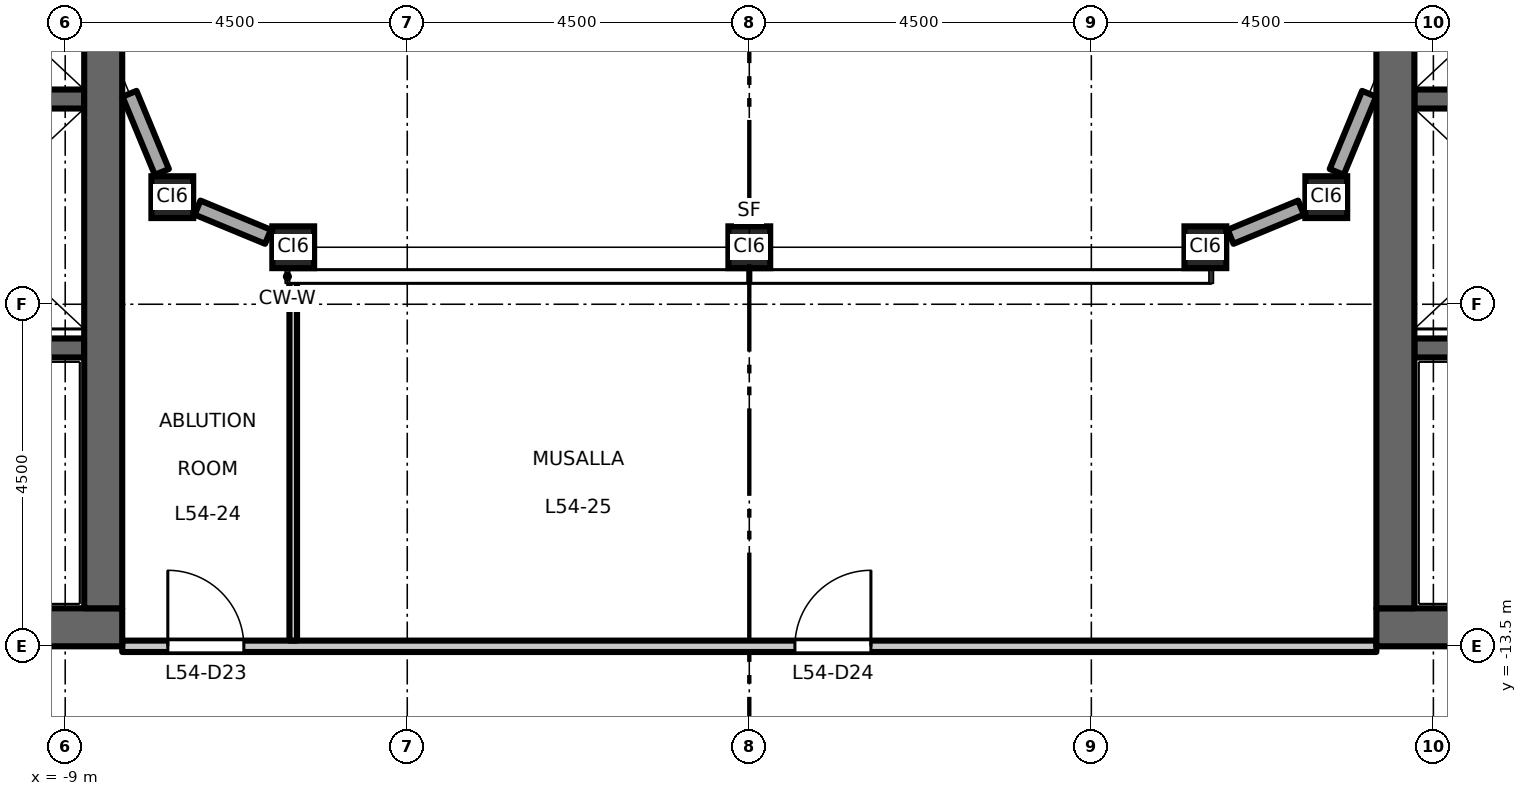
"""IFC4 building model, lengths in metres.
Left out: names, types, materials, properties, quantities, classifications, styles, units other than length and angle.
Written with IfcOpenShell. Run it as: python <this file> out.ifc"""

import sys

from ifc_helpers import new_model, si_unit, direction, frame, frame_2d, origin, origin_2d, place, context, subcontext, project, spatial, rectangle, hollow_rectangle, extrude, element, fill, save


model = new_model("IFC4")
c1 = context("Model", 3, precision=1e-05, world=origin(), true_north=direction((0.0, 1.0)))
c2 = subcontext(c1, "Body", "Model", "MODEL_VIEW")
j1 = project(units=[si_unit("LENGTHUNIT", "METRE"), si_unit("PLANEANGLEUNIT", "RADIAN")], contexts=[c1])
p1 = place(None, origin())
s1 = spatial("IfcSite", under=j1, at=p1, CompositionType="ELEMENT")
p2 = place(p1, origin())
s2 = spatial("IfcBuilding", under=s1, at=p2, CompositionType="ELEMENT")
p3 = place(p2, frame((0.0, 0.0, 251.2)))
s3 = spatial("IfcBuildingStorey", under=s2, at=p3, CompositionType="ELEMENT", Elevation=251.2)
for number, where, z_axis, x_axis in (
    (1, (-7.591, -7.591, 0.0), (0.0, 0.0, 1.0), (1.0, 0.0, 0.0)),
    (2, (-6.0, -8.25, 0.0), (0.0, 0.0, 1.0), (1.0, 0.0, 0.0)),
    (3, (0.0, -8.25, 0.0), (0.0, 0.0, 1.0), (1.0, 0.0, 0.0)),
    (4, (6.0, -8.25, 0.0), (0.0, 0.0, 1.0), (1.0, 0.0, 0.0)),
    (5, (7.591, -7.591, 0.0), (0.0, 0.0, 1.0), (1.0, 0.0, 0.0)),
):
    element("IfcColumn", number, at=place(p3, frame(where, z_axis=z_axis, x_axis=x_axis)), inside=s3, PredefinedType="COLUMN", context=c2, shape_type="SweptSolid", body=[
        extrude(hollow_rectangle(XDim=0.55, YDim=0.55, WallThickness=0.028, at=origin_2d()), origin(), (0.0, 0.0, 1.0), 4.5),
    ])
p4 = place(p3, frame((-8.75, -6.3, 0.0), z_axis=(0.0, 0.0, 1.0), x_axis=(-1.0, 0.0, 0.0)))
e6 = element("IfcWall", 6, at=p4, inside=s3, PredefinedType="SHEAR", context=c2, shape_type="SweptSolid", body=[
    extrude(rectangle(XDim=3.1, YDim=0.25, at=frame_2d((1.55, 0.0))), origin(), (0.0, 0.0, 1.0), 4.35),
])
p5 = place(p3, frame((-8.75, -9.575, 0.0), z_axis=(0.0, 0.0, 1.0), x_axis=(-1.0, 0.0, 0.0)))
e7 = element("IfcWall", 7, at=p5, inside=s3, PredefinedType="SHEAR", context=c2, shape_type="SweptSolid", body=[
    extrude(rectangle(XDim=8.0, YDim=0.25, at=frame_2d((4.0, 0.0))), origin(), (0.0, 0.0, 1.0), 4.35),
])
p6 = place(p5, frame((6.65, 0.0, 0.0)))
e8 = element("IfcOpeningElement", 8, at=p6, cuts=e7, PredefinedType="OPENING", context=c2, shape_type="SweptSolid", body=[
    extrude(rectangle(XDim=1.1, YDim=2.1, at=frame_2d((0.55, 1.05))), frame((0.0, 0.135, 0.0), z_axis=(0.0, -1.0, 0.0), x_axis=(1.0, 0.0, 0.0)), (0.0, 0.0, 1.0), 0.27),
])
p7 = place(p3, frame((-8.25, -13.25, 0.0), z_axis=(0.0, 0.0, 1.0), x_axis=(-1.0, 0.0, 0.0)))
e9 = element("IfcWall", 9, at=p7, inside=s3, PredefinedType="SHEAR", context=c2, shape_type="SweptSolid", body=[
    extrude(rectangle(XDim=13.5, YDim=0.5, at=frame_2d((6.75, 0.0))), origin(), (0.0, 0.0, 1.0), 4.35),
])
p8 = place(p3, frame((-8.5, -13.0, 0.0), z_axis=(0.0, 0.0, 1.0), x_axis=(0.0, 1.0, 0.0)))
e10 = element("IfcWall", 10, at=p8, inside=s3, PredefinedType="SHEAR", context=c2, shape_type="SweptSolid", body=[
    extrude(rectangle(XDim=26.0, YDim=0.5, at=frame_2d((13.0, 0.0))), origin(), (0.0, 0.0, 1.0), 4.35),
])
p9 = place(p3, frame((8.75, -6.3, 0.0), z_axis=(0.0, 0.0, 1.0), x_axis=(1.0, 0.0, 0.0)))
e11 = element("IfcWall", 11, at=p9, inside=s3, PredefinedType="SHEAR", context=c2, shape_type="SweptSolid", body=[
    extrude(rectangle(XDim=3.1, YDim=0.25, at=frame_2d((1.55, 0.0))), origin(), (0.0, 0.0, 1.0), 4.35),
])
p10 = place(p3, frame((8.75, -9.575, 0.0), z_axis=(0.0, 0.0, 1.0), x_axis=(1.0, 0.0, 0.0)))
e12 = element("IfcWall", 12, at=p10, inside=s3, PredefinedType="SHEAR", context=c2, shape_type="SweptSolid", body=[
    extrude(rectangle(XDim=8.0, YDim=0.25, at=frame_2d((4.0, 0.0))), origin(), (0.0, 0.0, 1.0), 4.35),
])
p11 = place(p10, frame((6.65, 0.0, 0.0)))
e13 = element("IfcOpeningElement", 13, at=p11, cuts=e12, PredefinedType="OPENING", context=c2, shape_type="SweptSolid", body=[
    extrude(rectangle(XDim=1.1, YDim=2.1, at=frame_2d((0.55, 1.05))), frame((0.0, 0.135, 0.0), z_axis=(0.0, -1.0, 0.0), x_axis=(1.0, 0.0, 0.0)), (0.0, 0.0, 1.0), 0.27),
])
p12 = place(p3, frame((8.25, -13.25, 0.0), z_axis=(0.0, 0.0, 1.0), x_axis=(1.0, 0.0, 0.0)))
e14 = element("IfcWall", 14, at=p12, inside=s3, PredefinedType="SHEAR", context=c2, shape_type="SweptSolid", body=[
    extrude(rectangle(XDim=13.5, YDim=0.5, at=frame_2d((6.75, 0.0))), origin(), (0.0, 0.0, 1.0), 4.35),
])
p13 = place(p3, frame((8.5, -13.0, 0.0), z_axis=(0.0, 0.0, 1.0), x_axis=(0.0, 1.0, 0.0)))
e15 = element("IfcWall", 15, at=p13, inside=s3, PredefinedType="SHEAR", context=c2, shape_type="SweptSolid", body=[
    extrude(rectangle(XDim=26.0, YDim=0.5, at=frame_2d((13.0, 0.0))), origin(), (0.0, 0.0, 1.0), 4.35),
])
p14 = place(p3, frame((6.332, -8.113, 0.0), z_axis=(0.0, 0.0, 1.0), x_axis=(0.923859650767, 0.382731427616, 0.0)))
e16 = element("IfcWall", 16, at=p14, inside=s3, PredefinedType="STANDARD", context=c2, shape_type="SweptSolid", body=[
    extrude(rectangle(XDim=1.003, YDim=0.2, at=frame_2d((0.502, 0.0))), origin(), (0.0, 0.0, 1.0), 3.918),
])
for number, where, z_axis, x_axis in (
    (17, (7.729, -7.259, 0.0), (0.0, 0.0, 1.0), (0.383, 0.924, 0.0)),
    (18, (-8.154, -6.231, 0.0), (0.0, 0.0, 1.0), (0.383, -0.924, 0.0)),
):
    element("IfcWall", number, at=place(p3, frame(where, z_axis=z_axis, x_axis=x_axis)), inside=s3, PredefinedType="STANDARD", context=c2, shape_type="SweptSolid", body=[
        extrude(rectangle(XDim=1.113, YDim=0.2, at=frame_2d((0.556, 0.0))), origin(), (0.0, 0.0, 1.0), 3.918),
    ])
p15 = place(p3, frame((-7.259, -7.729, 0.0), z_axis=(0.0, 0.0, 1.0), x_axis=(0.923859650767, -0.382731427616, 0.0)))
e19 = element("IfcWall", 19, at=p15, inside=s3, PredefinedType="STANDARD", context=c2, shape_type="SweptSolid", body=[
    extrude(rectangle(XDim=1.003, YDim=0.2, at=frame_2d((0.502, 0.0))), origin(), (0.0, 0.0, 1.0), 3.918),
])
p16 = place(p3, frame((-8.25, -13.5, 0.0), z_axis=(0.0, 0.0, 1.0), x_axis=(1.0, 0.0, 0.0)))
e20 = element("IfcWall", 20, at=p16, inside=s3, PredefinedType="PARTITIONING", context=c2, shape_type="SweptSolid", body=[
    extrude(rectangle(XDim=16.5, YDim=0.15, at=frame_2d((8.25, 0.0))), origin(), (0.0, 0.0, 1.0), 3.95),
])
p17 = place(p16, frame((0.6, 0.0, 0.0)))
e21 = element("IfcOpeningElement", 21, at=p17, cuts=e20, PredefinedType="OPENING", context=c2, shape_type="SweptSolid", body=[
    extrude(rectangle(XDim=1.0, YDim=2.1, at=frame_2d((0.5, 1.05))), frame((0.0, 0.085, 0.0), z_axis=(0.0, -1.0, 0.0), x_axis=(1.0, 0.0, 0.0)), (0.0, 0.0, 1.0), 0.17),
])
p18 = place(p16, frame((8.85, 0.0, 0.0)))
e22 = element("IfcOpeningElement", 22, at=p18, cuts=e20, PredefinedType="OPENING", context=c2, shape_type="SweptSolid", body=[
    extrude(rectangle(XDim=1.0, YDim=2.1, at=frame_2d((0.5, 1.05))), frame((0.0, 0.085, 0.0), z_axis=(0.0, -1.0, 0.0), x_axis=(1.0, 0.0, 0.0)), (0.0, 0.0, 1.0), 0.17),
])
p19 = place(p3, frame((-6.0, -13.425, 0.0), z_axis=(0.0, 0.0, 1.0), x_axis=(0.0, 1.0, 0.0)))
e23 = element("IfcWall", 23, at=p19, inside=s3, PredefinedType="PARTITIONING", context=c2, shape_type="SweptSolid", body=[
    extrude(rectangle(XDim=4.825, YDim=0.1, at=frame_2d((2.413, 0.0))), origin(), (0.0, 0.0, 1.0), 4.35),
])
p20 = place(p17, origin())
e24 = element("IfcDoor", 24, at=p20, inside=s3, OperationType="SINGLE_SWING_LEFT", PredefinedType="DOOR", context=c2, shape_type="SweptSolid", body=[
    extrude(rectangle(XDim=1.0, YDim=2.1, at=frame_2d((0.5, 1.05))), frame((0.0, 0.025, 0.0), z_axis=(0.0, -1.0, 0.0), x_axis=(1.0, 0.0, 0.0)), (0.0, 0.0, 1.0), 0.05),
])
fill(e21, e24)
p21 = place(p18, origin())
e25 = element("IfcDoor", 25, at=p21, inside=s3, OperationType="SINGLE_SWING_RIGHT", PredefinedType="DOOR", context=c2, shape_type="SweptSolid", body=[
    extrude(rectangle(XDim=1.0, YDim=2.1, at=frame_2d((0.5, 1.05))), frame((0.0, 0.025, 0.0), z_axis=(0.0, -1.0, 0.0), x_axis=(1.0, 0.0, 0.0)), (0.0, 0.0, 1.0), 0.05),
])
fill(e22, e25)
save(model, sys.argv[1])
